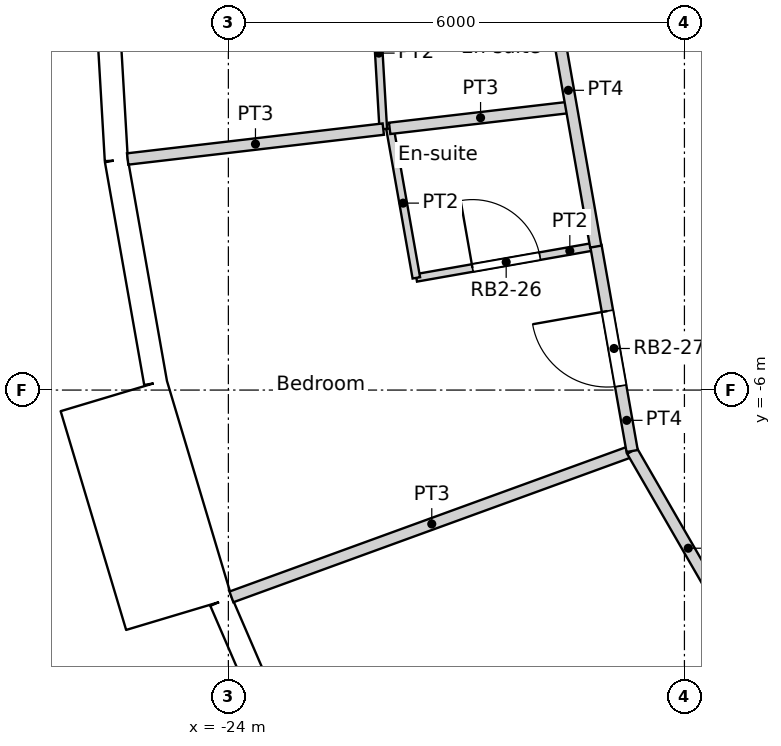
"""IFC4 building model, lengths in metres.
Left out: names, types, materials, properties, quantities, classifications, styles, units other than length and angle.
Written with IfcOpenShell. Run it as: python <this file> out.ifc"""

import sys

from ifc_helpers import new_model, si_unit, direction, frame, frame_2d, origin, origin_2d, place, context, subcontext, project, spatial, rectangle, circle, extrude, element, fill, save


model = new_model("IFC4")
c1 = context("Model", 3, precision=1e-05, world=origin(), true_north=direction((0.0, 1.0)))
c2 = subcontext(c1, "Body", "Model", "MODEL_VIEW")
j1 = project(units=[si_unit("LENGTHUNIT", "METRE"), si_unit("PLANEANGLEUNIT", "RADIAN")], contexts=[c1])
p1 = place(None, origin())
s1 = spatial("IfcSite", under=j1, at=p1, CompositionType="ELEMENT")
p2 = place(p1, origin())
s2 = spatial("IfcBuilding", under=s1, at=p2, CompositionType="ELEMENT")
p3 = place(p2, frame((0.0, 0.0, 136.8)))
s3 = spatial("IfcBuildingStorey", under=s2, at=p3, CompositionType="ELEMENT", Elevation=136.8)
for number, where, z_axis, x_axis in (
    (1, (-24.382, -2.85, 0.0), (0.0, 0.0, 1.0), (1.0, 0.0, 0.0)),
    (2, (-23.067, -8.396, 0.0), (0.0, 0.0, 1.0), (1.0, 0.0, 0.0)),
):
    element("IfcColumn", number, at=place(p3, frame(where, z_axis=z_axis, x_axis=x_axis)), inside=s3, PredefinedType="COLUMN", context=c2, shape_type="SweptSolid", body=[
        extrude(circle(Radius=0.6, at=origin_2d()), origin(), (0.0, 0.0, 1.0), 3.6),
    ])
p4 = place(p3, frame((-18.612, -2.805, 0.0), z_axis=(0.0, 0.0, 1.0), x_axis=(1.0, 0.0, 0.0)))
e3 = element("IfcColumn", 3, at=p4, inside=s3, PredefinedType="COLUMN", context=c2, shape_type="SweptSolid", body=[
    extrude(circle(Radius=0.65, at=origin_2d()), origin(), (0.0, 0.0, 1.0), 3.6),
])
p5 = place(p3, frame((-25.647, -0.01, 0.0), z_axis=(0.0, 0.0, 1.0), x_axis=(0.058139540521, -0.998308466271, 0.0)))
e4 = element("IfcWall", 4, at=p5, inside=s3, PredefinedType="SOLIDWALL", context=c2, shape_type="SweptSolid", body=[
    extrude(rectangle(XDim=2.973, YDim=0.3, at=frame_2d((1.487, 0.0))), origin(), (0.0, 0.0, 1.0), 2.8),
])
p6 = place(p5, frame((1.486, 0.0, 1.55)))
e5 = element("IfcOpeningElement", 5, at=p6, cuts=e4, PredefinedType="OPENING", context=c2, shape_type="SweptSolid", body=[
    extrude(circle(Radius=0.9, at=origin_2d()), frame((0.0, 0.16, 0.0), z_axis=(0.0, -1.0, 0.0), x_axis=(1.0, 0.0, 0.0)), (0.0, 0.0, 1.0), 0.32),
])
p7 = place(p3, frame((-25.474, -2.978, 0.0), z_axis=(0.0, 0.0, 1.0), x_axis=(0.173686952598, -0.984800915159, 0.0)))
e6 = element("IfcWall", 6, at=p7, inside=s3, PredefinedType="SOLIDWALL", context=c2, shape_type="SweptSolid", body=[
    extrude(rectangle(XDim=2.973, YDim=0.3, at=frame_2d((1.486, 0.0))), origin(), (0.0, 0.0, 1.0), 3.3),
])
p8 = place(p7, frame((1.486, 0.0, 1.55)))
e7 = element("IfcOpeningElement", 7, at=p8, cuts=e6, PredefinedType="OPENING", context=c2, shape_type="SweptSolid", body=[
    extrude(circle(Radius=0.9, at=origin_2d()), frame((0.0, 0.16, 0.0), z_axis=(0.0, -1.0, 0.0), x_axis=(1.0, 0.0, 0.0)), (0.0, 0.0, 1.0), 0.32),
])
p9 = place(p3, frame((-25.51, -6.071, -0.3), z_axis=(0.0, 0.0, 1.0), x_axis=(0.286780420304, -0.957996341606, 0.0)))
e8 = element("IfcWall", 8, at=p9, inside=s3, PredefinedType="ELEMENTEDWALL", context=c2, shape_type="SweptSolid", body=[
    extrude(rectangle(XDim=3.0, YDim=1.45, at=frame_2d((1.5, 0.0))), origin(), (0.0, 0.0, 1.0), 3.6),
])
p10 = place(p9, frame((1.5, 0.0, 1.85)))
e9 = element("IfcOpeningElement", 9, at=p10, cuts=e8, PredefinedType="OPENING", context=c2, shape_type="SweptSolid", body=[
    extrude(circle(Radius=0.9, at=origin_2d()), frame((0.0, 0.735, 0.0), z_axis=(0.0, -1.0, 0.0), x_axis=(1.0, 0.0, 0.0)), (0.0, 0.0, 1.0), 1.47),
])
p11 = place(p3, frame((-24.097, -8.781, 0.0), z_axis=(0.0, 0.0, 1.0), x_axis=(0.396078892785, -0.918216483565, 0.0)))
e10 = element("IfcWall", 10, at=p11, inside=s3, PredefinedType="SOLIDWALL", context=c2, shape_type="SweptSolid", body=[
    extrude(rectangle(XDim=2.973, YDim=0.3, at=frame_2d((1.486, 0.0))), origin(), (0.0, 0.0, 1.0), 2.8),
])
p12 = place(p11, frame((1.486, 0.0, 1.55)))
e11 = element("IfcOpeningElement", 11, at=p12, cuts=e10, PredefinedType="OPENING", context=c2, shape_type="SweptSolid", body=[
    extrude(circle(Radius=0.9, at=origin_2d()), frame((0.0, 0.16, 0.0), z_axis=(0.0, -1.0, 0.0), x_axis=(1.0, 0.0, 0.0)), (0.0, 0.0, 1.0), 0.32),
])
p13 = place(p3, frame((-19.888, 0.0, 0.0), z_axis=(0.0, 0.0, 1.0), x_axis=(0.1727845501, -0.984959643461, 0.0)))
e12 = element("IfcWall", 12, at=p13, inside=s3, PredefinedType="PARTITIONING", context=c2, shape_type="SweptSolid", body=[
    extrude(rectangle(XDim=4.175, YDim=0.15, at=frame_2d((2.088, 0.0))), origin(), (0.0, 0.0, 1.0), 3.3),
])
p14 = place(p3, frame((-19.164, -4.104, 0.0), z_axis=(0.0, 0.0, 1.0), x_axis=(0.173770083029, -0.984786250028, 0.0)))
e13 = element("IfcWall", 13, at=p14, inside=s3, PredefinedType="PARTITIONING", context=c2, shape_type="SweptSolid", body=[
    extrude(rectangle(XDim=2.74, YDim=0.15, at=frame_2d((1.37, 0.0))), origin(), (0.0, 0.0, 1.0), 3.3),
])
p15 = place(p14, frame((0.87, 0.0, 0.0)))
e14 = element("IfcOpeningElement", 14, at=p15, cuts=e13, PredefinedType="OPENING", context=c2, shape_type="SweptSolid", body=[
    extrude(rectangle(XDim=1.0, YDim=2.1, at=frame_2d((0.5, 1.05))), frame((0.0, 0.075, 0.0), z_axis=(0.0, -1.0, 0.0), x_axis=(1.0, 0.0, 0.0)), (0.0, 0.0, 1.0), 0.15),
])
p16 = place(p3, frame((-18.688, -6.802, 0.0), z_axis=(0.0, 0.0, 1.0), x_axis=(0.499914202267, -0.866074933462, 0.0)))
e15 = element("IfcWall", 15, at=p16, inside=s3, PredefinedType="PARTITIONING", context=c2, shape_type="SweptSolid", body=[
    extrude(rectangle(XDim=6.907, YDim=0.15, at=frame_2d((3.454, 0.0))), origin(), (0.0, 0.0, 1.0), 3.3),
])
p17 = place(p16, frame((3.003, 0.0, 0.0)))
e16 = element("IfcOpeningElement", 16, at=p17, cuts=e15, PredefinedType="OPENING", context=c2, shape_type="SweptSolid", body=[
    extrude(rectangle(XDim=1.8, YDim=2.1, at=frame_2d((0.9, 1.05))), frame((0.0, 0.075, 0.0), z_axis=(0.0, -1.0, 0.0), x_axis=(1.0, 0.0, 0.0)), (0.0, 0.0, 1.0), 0.15),
])
p18 = place(p3, frame((-22.079, -0.567, 0.0), z_axis=(0.0, 0.0, 1.0), x_axis=(0.058493425416, -0.998287793766, 0.0)))
e17 = element("IfcWall", 17, at=p18, inside=s3, PredefinedType="PARTITIONING", context=c2, shape_type="SweptSolid", body=[
    extrude(rectangle(XDim=2.003, YDim=0.1, at=frame_2d((1.002, 0.0))), origin(), (0.0, 0.0, 1.0), 3.3),
])
p19 = place(p3, frame((-25.325, -2.96, 0.0), z_axis=(0.0, 0.0, 1.0), x_axis=(0.993238911344, 0.11608817766, 0.0)))
e18 = element("IfcWall", 18, at=p19, inside=s3, PredefinedType="PARTITIONING", context=c2, shape_type="SweptSolid", body=[
    extrude(rectangle(XDim=3.386, YDim=0.15, at=frame_2d((1.693, 0.0))), origin(), (0.0, 0.0, 1.0), 3.3),
])
p20 = place(p3, frame((-21.878, -2.557, 0.0), z_axis=(0.0, 0.0, 1.0), x_axis=(0.99327460921, 0.115782341913, 0.0)))
e19 = element("IfcWall", 19, at=p20, inside=s3, PredefinedType="PARTITIONING", context=c2, shape_type="SweptSolid", body=[
    extrude(rectangle(XDim=2.408, YDim=0.15, at=frame_2d((1.204, 0.0))), origin(), (0.0, 0.0, 1.0), 3.3),
])
p21 = place(p3, frame((-21.874, -2.557, 0.0), z_axis=(0.0, 0.0, 1.0), x_axis=(0.17368771375, -0.984800780916, 0.0)))
e20 = element("IfcWall", 20, at=p21, inside=s3, PredefinedType="PARTITIONING", context=c2, shape_type="SweptSolid", body=[
    extrude(rectangle(XDim=1.997, YDim=0.1, at=frame_2d((0.999, 0.0))), origin(), (0.0, 0.0, 1.0), 3.3),
])
p22 = place(p3, frame((-21.527, -4.524, 0.0), z_axis=(0.0, 0.0, 1.0), x_axis=(0.9848663854, 0.173315327969, 0.0)))
e21 = element("IfcWall", 21, at=p22, inside=s3, PredefinedType="PARTITIONING", context=c2, shape_type="SweptSolid", body=[
    extrude(rectangle(XDim=2.4, YDim=0.1, at=frame_2d((1.2, 0.0))), origin(), (0.0, 0.0, 1.0), 3.3),
])
p23 = place(p22, frame((0.75, 0.0, 0.0)))
e22 = element("IfcOpeningElement", 22, at=p23, cuts=e21, PredefinedType="OPENING", context=c2, shape_type="SweptSolid", body=[
    extrude(rectangle(XDim=0.9, YDim=2.04, at=frame_2d((0.45, 1.02))), frame((0.0, 0.05, 0.0), z_axis=(0.0, -1.0, 0.0), x_axis=(1.0, 0.0, 0.0)), (0.0, 0.0, 1.0), 0.1),
])
p24 = place(p3, frame((-23.96, -8.721, 0.0), z_axis=(0.0, 0.0, 1.0), x_axis=(0.939686652043, 0.342036541866, 0.0)))
e23 = element("IfcWall", 23, at=p24, inside=s3, PredefinedType="PARTITIONING", context=c2, shape_type="SweptSolid", body=[
    extrude(rectangle(XDim=5.61, YDim=0.15, at=frame_2d((2.805, 0.0))), origin(), (0.0, 0.0, 1.0), 3.3),
])
p25 = place(p6, origin())
e24 = element("IfcWindow", 24, at=p25, inside=s3, PartitioningType="SINGLE_PANEL", PredefinedType="WINDOW", context=c2, shape_type="SweptSolid", body=[
    extrude(circle(Radius=0.9, at=origin_2d()), frame((0.0, 0.12, 0.0), z_axis=(0.0, -1.0, 0.0), x_axis=(1.0, 0.0, 0.0)), (0.0, 0.0, 1.0), 0.1),
])
fill(e5, e24)
p26 = place(p8, origin())
e25 = element("IfcWindow", 25, at=p26, inside=s3, PartitioningType="SINGLE_PANEL", PredefinedType="WINDOW", context=c2, shape_type="SweptSolid", body=[
    extrude(circle(Radius=0.9, at=origin_2d()), frame((0.0, 0.12, 0.0), z_axis=(0.0, -1.0, 0.0), x_axis=(1.0, 0.0, 0.0)), (0.0, 0.0, 1.0), 0.1),
])
fill(e7, e25)
p27 = place(p10, origin())
e26 = element("IfcWindow", 26, at=p27, inside=s3, PartitioningType="SINGLE_PANEL", PredefinedType="WINDOW", context=c2, shape_type="SweptSolid", body=[
    extrude(circle(Radius=0.9, at=origin_2d()), frame((0.0, 0.695, 0.0), z_axis=(0.0, -1.0, 0.0), x_axis=(1.0, 0.0, 0.0)), (0.0, 0.0, 1.0), 0.1),
])
fill(e9, e26)
p28 = place(p12, origin())
e27 = element("IfcWindow", 27, at=p28, inside=s3, PartitioningType="SINGLE_PANEL", PredefinedType="WINDOW", context=c2, shape_type="SweptSolid", body=[
    extrude(circle(Radius=0.9, at=origin_2d()), frame((0.0, 0.12, 0.0), z_axis=(0.0, -1.0, 0.0), x_axis=(1.0, 0.0, 0.0)), (0.0, 0.0, 1.0), 0.1),
])
fill(e11, e27)
p29 = place(p23, origin())
e28 = element("IfcDoor", 28, at=p29, inside=s3, OperationType="SINGLE_SWING_LEFT", PredefinedType="DOOR", context=c2, shape_type="SweptSolid", body=[
    extrude(rectangle(XDim=0.9, YDim=2.04, at=frame_2d((0.45, 1.02))), frame((0.0, 0.025, 0.0), z_axis=(0.0, -1.0, 0.0), x_axis=(1.0, 0.0, 0.0)), (0.0, 0.0, 1.0), 0.05),
])
fill(e22, e28)
p30 = place(p15, origin())
e29 = element("IfcDoor", 29, at=p30, inside=s3, OperationType="SINGLE_SWING_RIGHT", PredefinedType="DOOR", context=c2, shape_type="SweptSolid", body=[
    extrude(rectangle(XDim=1.0, YDim=2.1, at=frame_2d((0.5, 1.05))), frame((0.0, 0.025, 0.0), z_axis=(0.0, -1.0, 0.0), x_axis=(1.0, 0.0, 0.0)), (0.0, 0.0, 1.0), 0.05),
])
fill(e14, e29)
save(model, sys.argv[1])
